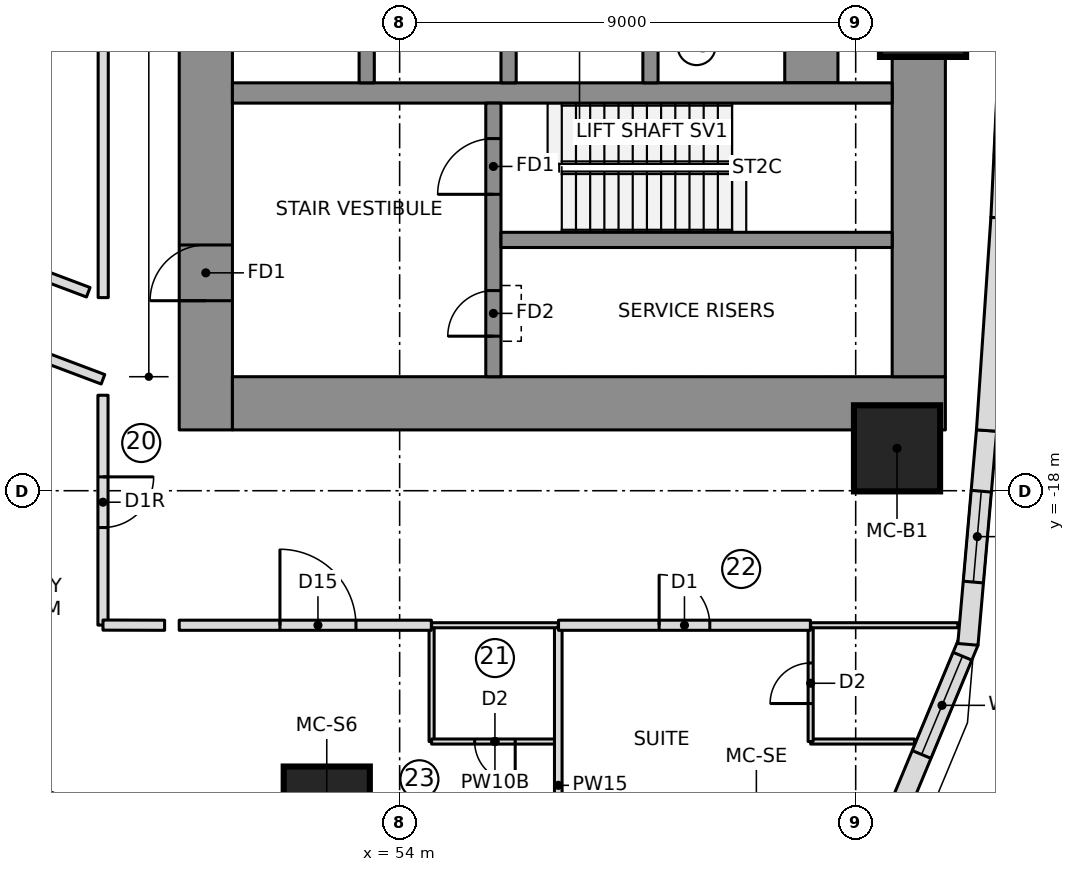
"""IFC4 building model, lengths in metres.
Left out: names, types, materials, properties, quantities, classifications, styles, units other than length and angle.
Written with IfcOpenShell. Run it as: python <this file> out.ifc"""

import sys

from ifc_helpers import new_model, si_unit, direction, frame, frame_2d, origin, origin_2d, place, context, subcontext, project, spatial, polyline, rectangle, outline, extrude, element, fill, save


model = new_model("IFC4")
c1 = context("Model", 3, precision=1e-05, world=origin(), true_north=direction((0.0, 1.0)))
c2 = subcontext(c1, "Body", "Model", "MODEL_VIEW")
j1 = project(units=[si_unit("LENGTHUNIT", "METRE"), si_unit("PLANEANGLEUNIT", "RADIAN")], contexts=[c1])
p1 = place(None, origin())
s1 = spatial("IfcSite", under=j1, at=p1, CompositionType="ELEMENT")
p2 = place(p1, origin())
s2 = spatial("IfcBuilding", under=s1, at=p2, CompositionType="ELEMENT")
p3 = place(p2, frame((0.0, 0.0, 80.3)))
s3 = spatial("IfcBuildingStorey", under=s2, at=p3, CompositionType="ELEMENT", Elevation=80.3)
p4 = place(p3, frame((50.175, -16.8, 0.0), z_axis=(0.0, 0.0, 1.0), x_axis=(0.0, 1.0, 0.0)))
e1 = element("IfcWall", 1, at=p4, inside=s3, PredefinedType="SHEAR", context=c2, shape_type="SweptSolid", body=[
    extrude(rectangle(XDim=10.15, YDim=1.05, at=frame_2d((5.075, 0.0))), origin(), (0.0, 0.0, 1.0), 4.6),
])
p5 = place(p4, frame((2.55, 0.0, 0.0)))
e2 = element("IfcOpeningElement", 2, at=p5, cuts=e1, PredefinedType="OPENING", context=c2, shape_type="SweptSolid", body=[
    extrude(rectangle(XDim=1.1, YDim=2.1, at=frame_2d((0.55, 1.05))), frame((0.0, 0.535, 0.0), z_axis=(0.0, -1.0, 0.0), x_axis=(1.0, 0.0, 0.0)), (0.0, 0.0, 1.0), 1.07),
])
p6 = place(p3, frame((50.7, -16.275, 0.0), z_axis=(0.0, 0.0, 1.0), x_axis=(1.0, 0.0, 0.0)))
e3 = element("IfcWall", 3, at=p6, inside=s3, PredefinedType="SHEAR", context=c2, shape_type="SweptSolid", body=[
    extrude(rectangle(XDim=14.07, YDim=1.05, at=frame_2d((7.035, 0.0))), origin(), (0.0, 0.0, 1.0), 4.6),
])
p7 = place(p3, frame((64.245, -15.75, 0.0), z_axis=(0.0, 0.0, 1.0), x_axis=(0.0, 1.0, 0.0)))
e4 = element("IfcWall", 4, at=p7, inside=s3, PredefinedType="SHEAR", context=c2, shape_type="SweptSolid", body=[
    extrude(rectangle(XDim=6.361, YDim=1.05, at=frame_2d((3.181, 0.0))), origin(), (0.0, 0.0, 1.0), 4.6),
])
p8 = place(p3, frame((62.125, -9.95, 0.0), z_axis=(0.0, 0.0, 1.0), x_axis=(0.0, 1.0, 0.0)))
e5 = element("IfcWall", 5, at=p8, inside=s3, PredefinedType="SHEAR", context=c2, shape_type="SweptSolid", body=[
    extrude(rectangle(XDim=19.9, YDim=1.05, at=frame_2d((9.95, 0.0))), origin(), (0.0, 0.0, 1.0), 4.6),
])
p9 = place(p3, frame((50.7, -10.15, 0.0), z_axis=(0.0, 0.0, 1.0), x_axis=(1.0, 0.0, 0.0)))
e6 = element("IfcWall", 6, at=p9, inside=s3, PredefinedType="SHEAR", context=c2, shape_type="SweptSolid", body=[
    extrude(rectangle(XDim=13.02, YDim=0.4, at=frame_2d((6.51, 0.0))), origin(), (0.0, 0.0, 1.0), 4.6),
])
for number, where, z_axis, x_axis in (
    (7, (53.35, -9.95, 0.0), (0.0, 0.0, 1.0), (0.0, 1.0, 0.0)),
    (8, (56.15, -9.95, 0.0), (0.0, 0.0, 1.0), (0.0, 1.0, 0.0)),
    (9, (58.95, -9.95, 0.0), (0.0, 0.0, 1.0), (0.0, 1.0, 0.0)),
):
    element("IfcWall", number, at=place(p3, frame(where, z_axis=z_axis, x_axis=x_axis)), inside=s3, PredefinedType="SHEAR", context=c2, shape_type="SweptSolid", body=[
        extrude(rectangle(XDim=3.0, YDim=0.3, at=frame_2d((1.5, 0.0))), origin(), (0.0, 0.0, 1.0), 4.6),
    ])
p10 = place(p3, frame((55.85, -15.75, 0.0), z_axis=(0.0, 0.0, 1.0), x_axis=(0.0, 1.0, 0.0)))
e10 = element("IfcWall", 10, at=p10, inside=s3, PredefinedType="SHEAR", context=c2, shape_type="SweptSolid", body=[
    extrude(rectangle(XDim=5.4, YDim=0.3, at=frame_2d((2.7, 0.0))), origin(), (0.0, 0.0, 1.0), 4.6),
])
p11 = place(p10, frame((3.6, 0.0, 0.0)))
e11 = element("IfcOpeningElement", 11, at=p11, cuts=e10, PredefinedType="OPENING", context=c2, shape_type="SweptSolid", body=[
    extrude(rectangle(XDim=1.1, YDim=2.1, at=frame_2d((0.55, 1.05))), frame((0.0, 0.16, 0.0), z_axis=(0.0, -1.0, 0.0), x_axis=(1.0, 0.0, 0.0)), (0.0, 0.0, 1.0), 0.32),
])
p12 = place(p10, frame((0.8, 0.0, 0.0)))
e12 = element("IfcOpeningElement", 12, at=p12, cuts=e10, PredefinedType="OPENING", context=c2, shape_type="SweptSolid", body=[
    extrude(rectangle(XDim=0.9, YDim=2.1, at=frame_2d((0.45, 1.05))), frame((0.0, 0.16, 0.0), z_axis=(0.0, -1.0, 0.0), x_axis=(1.0, 0.0, 0.0)), (0.0, 0.0, 1.0), 0.32),
])
p13 = place(p3, frame((56.0, -13.05, 0.0), z_axis=(0.0, 0.0, 1.0), x_axis=(1.0, 0.0, 0.0)))
e13 = element("IfcWall", 13, at=p13, inside=s3, PredefinedType="SHEAR", context=c2, shape_type="SweptSolid", body=[
    extrude(rectangle(XDim=7.72, YDim=0.3, at=frame_2d((3.86, 0.0))), origin(), (0.0, 0.0, 1.0), 4.6),
])
for number, where, z_axis, x_axis in (
    (14, (52.562, -24.293, 0.0), (0.0, 0.0, 1.0), (1.0, 0.0, 0.0)),
    (15, (63.816, -17.164, 0.0), (0.0, 0.0, 1.0), (1.0, 0.0, 0.0)),
    (16, (64.329, -8.589, 0.0), (0.0, 0.0, 1.0), (1.0, 0.0, 0.0)),
):
    element("IfcColumn", number, at=place(p3, frame(where, z_axis=z_axis, x_axis=x_axis)), inside=s3, PredefinedType="COLUMN", context=c2, shape_type="SweptSolid", body=[
        extrude(rectangle(XDim=1.7, YDim=1.7, at=origin_2d()), origin(), (0.0, 0.0, 1.0), 4.6),
    ])
p14 = place(p3, frame((63.59, -24.916, 0.0), z_axis=(0.0, 0.0, 1.0), x_axis=(0.383997751971, 0.923334027577, 0.0)))
e17 = element("IfcWall", 17, at=p14, inside=s3, PredefinedType="NOTDEFINED", context=c2, shape_type="SweptSolid", body=[
    extrude(outline(polyline([(-0.061, -0.2), (4.27, -0.2), (4.208, 0.2), (0.061, 0.2), (-0.061, -0.2)])), origin(), (0.0, 0.0, 1.0), 4.3),
])
p15 = place(p14, frame((1.852, 0.0, 0.6)))
e18 = element("IfcOpeningElement", 18, at=p15, cuts=e17, PredefinedType="OPENING", context=c2, shape_type="SweptSolid", body=[
    extrude(outline(polyline([(0.0, 1.4), (0.08, 1.802), (0.308, 2.142), (0.648, 2.37), (1.05, 2.45), (1.452, 2.37), (1.792, 2.142), (2.02, 1.802), (2.1, 1.4), (2.1, 1.05), (2.02, 0.648), (1.792, 0.308), (1.452, 0.08), (1.05, 0.0), (0.648, 0.08), (0.308, 0.308), (0.08, 0.648), (0.0, 1.05), (0.0, 1.4)])), frame((0.0, 0.21, 0.0), z_axis=(0.0, -1.0, 0.0), x_axis=(1.0, 0.0, 0.0)), (0.0, 0.0, 1.0), 0.42),
])
p16 = place(p3, frame((65.217, -21.002, 0.0), z_axis=(0.0, 0.0, 1.0), x_axis=(0.086992730434, 0.996208946382, 0.0)))
e19 = element("IfcWall", 19, at=p16, inside=s3, PredefinedType="NOTDEFINED", context=c2, shape_type="SweptSolid", body=[
    extrude(outline(polyline([(-0.031, -0.2), (4.209, -0.2), (4.205, 0.2), (0.031, 0.2), (-0.031, -0.2)])), origin(), (0.0, 0.0, 1.0), 4.3),
])
p17 = place(p16, frame((1.203, 0.0, 1.8)))
e20 = element("IfcOpeningElement", 20, at=p17, cuts=e19, PredefinedType="OPENING", context=c2, shape_type="SweptSolid", body=[
    extrude(rectangle(XDim=1.8, YDim=1.2, at=frame_2d((0.9, 0.6))), frame((0.0, 0.21, 0.0), z_axis=(0.0, -1.0, 0.0), x_axis=(1.0, 0.0, 0.0)), (0.0, 0.0, 1.0), 0.42),
])
p18 = place(p3, frame((65.583, -16.811, 0.0), z_axis=(0.0, 0.0, 1.0), x_axis=(0.067724559895, 0.997704056315, 0.0)))
e21 = element("IfcWall", 21, at=p18, inside=s3, PredefinedType="NOTDEFINED", context=c2, shape_type="SweptSolid", body=[
    extrude(outline(polyline([(-0.002, -0.2), (4.209, -0.2), (4.205, 0.2), (0.002, 0.2), (-0.002, -0.2)])), origin(), (0.0, 0.0, 1.0), 4.3),
])
p19 = place(p3, frame((65.868, -12.614, 0.0), z_axis=(0.0, 0.0, 1.0), x_axis=(0.048342691508, 0.998830808585, 0.0)))
e22 = element("IfcWall", 22, at=p19, inside=s3, PredefinedType="NOTDEFINED", context=c2, shape_type="SweptSolid", body=[
    extrude(outline(polyline([(-0.002, -0.2), (4.209, -0.2), (4.205, 0.2), (0.002, 0.2), (-0.002, -0.2)])), origin(), (0.0, 0.0, 1.0), 4.3),
])
p20 = place(p19, frame((1.203, 0.0, 1.8)))
e23 = element("IfcOpeningElement", 23, at=p20, cuts=e22, PredefinedType="OPENING", context=c2, shape_type="SweptSolid", body=[
    extrude(rectangle(XDim=1.8, YDim=1.2, at=frame_2d((0.9, 0.6))), frame((0.0, 0.21, 0.0), z_axis=(0.0, -1.0, 0.0), x_axis=(1.0, 0.0, 0.0)), (0.0, 0.0, 1.0), 0.42),
])
p21 = place(p3, frame((44.038, -23.775, 0.0), z_axis=(0.0, 0.0, 1.0), x_axis=(0.928295561605, -0.371843179719, 0.0)))
e24 = element("IfcWall", 24, at=p21, inside=s3, PredefinedType="PARAPET", context=c2, shape_type="SweptSolid", body=[
    extrude(rectangle(XDim=4.186, YDim=0.2, at=frame_2d((2.093, 0.0))), origin(), (0.0, 0.0, 1.0), 1.1),
])
p22 = place(p3, frame((54.631, -22.95, 0.0), z_axis=(0.0, 0.0, 1.0), x_axis=(0.0, 1.0, 0.0)))
e25 = element("IfcWall", 25, at=p22, inside=s3, PredefinedType="PARTITIONING", context=c2, shape_type="SweptSolid", body=[
    extrude(rectangle(XDim=2.3, YDim=0.1, at=frame_2d((1.15, 0.0))), origin(), (0.0, 0.0, 1.0), 4.3),
])
p23 = place(p3, frame((57.131, -22.95, 0.0), z_axis=(0.0, 0.0, 1.0), x_axis=(-1.0, 0.0, 0.0)))
e26 = element("IfcWall", 26, at=p23, inside=s3, PredefinedType="PARTITIONING", context=c2, shape_type="SweptSolid", body=[
    extrude(rectangle(XDim=2.5, YDim=0.1, at=frame_2d((1.25, 0.0))), origin(), (0.0, 0.0, 1.0), 4.3),
])
p24 = place(p23, frame((0.85, 0.0, 0.0)))
e27 = element("IfcOpeningElement", 27, at=p24, cuts=e26, PredefinedType="OPENING", context=c2, shape_type="SweptSolid", body=[
    extrude(rectangle(XDim=0.8, YDim=2.1, at=frame_2d((0.4, 1.05))), frame((0.0, 0.06, 0.0), z_axis=(0.0, -1.0, 0.0), x_axis=(1.0, 0.0, 0.0)), (0.0, 0.0, 1.0), 0.12),
])
p25 = place(p3, frame((64.16, -22.95, 0.0), z_axis=(0.0, 0.0, 1.0), x_axis=(-1.0, 0.0, 0.0)))
e28 = element("IfcWall", 28, at=p25, inside=s3, PredefinedType="PARTITIONING", context=c2, shape_type="SweptSolid", body=[
    extrude(rectangle(XDim=2.049, YDim=0.1, at=frame_2d((1.025, 0.0))), origin(), (0.0, 0.0, 1.0), 4.3),
])
p26 = place(p3, frame((62.111, -22.95, 0.0), z_axis=(0.0, 0.0, 1.0), x_axis=(0.0, 1.0, 0.0)))
e29 = element("IfcWall", 29, at=p26, inside=s3, PredefinedType="PARTITIONING", context=c2, shape_type="SweptSolid", body=[
    extrude(rectangle(XDim=2.3, YDim=0.1, at=frame_2d((1.15, 0.0))), origin(), (0.0, 0.0, 1.0), 4.3),
])
p27 = place(p26, frame((0.75, 0.0, 0.0)))
e30 = element("IfcOpeningElement", 30, at=p27, cuts=e29, PredefinedType="OPENING", context=c2, shape_type="SweptSolid", body=[
    extrude(rectangle(XDim=0.8, YDim=2.1, at=frame_2d((0.4, 1.05))), frame((0.0, 0.06, 0.0), z_axis=(0.0, -1.0, 0.0), x_axis=(1.0, 0.0, 0.0)), (0.0, 0.0, 1.0), 0.12),
])
p28 = place(p3, frame((57.131, -26.979, 0.0), z_axis=(0.0, 0.0, 1.0), x_axis=(0.0, 1.0, 0.0)))
e31 = element("IfcWall", 31, at=p28, inside=s3, PredefinedType="PARTITIONING", context=c2, shape_type="SweptSolid", body=[
    extrude(rectangle(XDim=6.329, YDim=0.15, at=frame_2d((3.165, 0.0))), origin(), (0.0, 0.0, 1.0), 4.3),
])
p29 = place(p3, frame((49.65, -20.655, 0.0), z_axis=(0.0, 0.0, 1.0), x_axis=(1.0, 0.0, 0.0)))
e32 = element("IfcWall", 32, at=p29, inside=s3, PredefinedType="PARTITIONING", context=c2, shape_type="SweptSolid", body=[
    extrude(rectangle(XDim=4.976, YDim=0.2, at=frame_2d((2.488, 0.0))), origin(), (0.0, 0.0, 1.0), 4.3),
])
p30 = place(p29, frame((1.988, 0.0, 0.0)))
e33 = element("IfcOpeningElement", 33, at=p30, cuts=e32, PredefinedType="OPENING", context=c2, shape_type="SweptSolid", body=[
    extrude(rectangle(XDim=1.5, YDim=2.1, at=frame_2d((0.75, 1.05))), frame((0.0, 0.11, 0.0), z_axis=(0.0, -1.0, 0.0), x_axis=(1.0, 0.0, 0.0)), (0.0, 0.0, 1.0), 0.22),
])
p31 = place(p3, frame((57.135, -20.655, 0.0), z_axis=(0.0, 0.0, 1.0), x_axis=(1.0, 0.0, 0.0)))
e34 = element("IfcWall", 34, at=p31, inside=s3, PredefinedType="PARTITIONING", context=c2, shape_type="SweptSolid", body=[
    extrude(rectangle(XDim=4.971, YDim=0.2, at=frame_2d((2.485, 0.0))), origin(), (0.0, 0.0, 1.0), 4.3),
])
p32 = place(p31, frame((1.985, 0.0, 0.0)))
e35 = element("IfcOpeningElement", 35, at=p32, cuts=e34, PredefinedType="OPENING", context=c2, shape_type="SweptSolid", body=[
    extrude(rectangle(XDim=1.0, YDim=2.1, at=frame_2d((0.5, 1.05))), frame((0.0, 0.11, 0.0), z_axis=(0.0, -1.0, 0.0), x_axis=(1.0, 0.0, 0.0)), (0.0, 0.0, 1.0), 0.22),
])
p33 = place(p3, frame((54.631, -20.655, 0.0), z_axis=(0.0, 0.0, 1.0), x_axis=(1.0, 0.0, 0.0)))
e36 = element("IfcWall", 36, at=p33, inside=s3, PredefinedType="PARTITIONING", context=c2, shape_type="SweptSolid", body=[
    extrude(rectangle(XDim=2.5, YDim=0.1, at=frame_2d((1.25, 0.0))), origin(), (0.0, 0.0, 1.0), 4.3),
])
p34 = place(p3, frame((62.111, -20.655, 0.0), z_axis=(0.0, 0.0, 1.0), x_axis=(1.0, 0.0, 0.0)))
e37 = element("IfcWall", 37, at=p34, inside=s3, PredefinedType="PARTITIONING", context=c2, shape_type="SweptSolid", body=[
    extrude(rectangle(XDim=2.906, YDim=0.1, at=frame_2d((1.453, 0.0))), origin(), (0.0, 0.0, 1.0), 4.3),
])
p35 = place(p3, frame((47.855, -14.083, 0.0), z_axis=(0.0, 0.0, 1.0), x_axis=(-0.935907269358, 0.352246480696, 0.0)))
e38 = element("IfcWall", 38, at=p35, inside=s3, PredefinedType="PARTITIONING", context=c2, shape_type="SweptSolid", body=[
    extrude(rectangle(XDim=1.239, YDim=0.2, at=frame_2d((0.619, 0.0))), origin(), (0.0, 0.0, 1.0), 4.3),
])
p36 = place(p3, frame((48.145, -16.116, 0.0), z_axis=(0.0, 0.0, 1.0), x_axis=(5.3821313e-05, -0.999999998552, 0.0)))
e39 = element("IfcWall", 39, at=p36, inside=s3, PredefinedType="PARTITIONING", context=c2, shape_type="SweptSolid", body=[
    extrude(rectangle(XDim=4.536, YDim=0.2, at=frame_2d((2.268, 0.0))), origin(), (0.0, 0.0, 1.0), 4.3),
])
p37 = place(p36, frame((1.611, 0.0, 0.0)))
e40 = element("IfcOpeningElement", 40, at=p37, cuts=e39, PredefinedType="OPENING", context=c2, shape_type="SweptSolid", body=[
    extrude(rectangle(XDim=1.0, YDim=2.1, at=frame_2d((0.5, 1.05))), frame((0.0, 0.11, 0.0), z_axis=(0.0, -1.0, 0.0), x_axis=(1.0, 0.0, 0.0)), (0.0, 0.0, 1.0), 0.22),
])
p38 = place(p3, frame((48.15, 14.189, 0.0), z_axis=(0.0, 0.0, 1.0), x_axis=(0.0, -1.0, 0.0)))
e41 = element("IfcWall", 41, at=p38, inside=s3, PredefinedType="PARTITIONING", context=c2, shape_type="SweptSolid", body=[
    extrude(rectangle(XDim=28.377, YDim=0.2, at=frame_2d((14.189, 0.0))), origin(), (0.0, 0.0, 1.0), 4.3),
])
p39 = place(p3, frame((46.93, -15.343, 0.0), z_axis=(0.0, 0.0, 1.0), x_axis=(0.935833600022, -0.352442155635, 0.0)))
e42 = element("IfcWall", 42, at=p39, inside=s3, PredefinedType="PARTITIONING", context=c2, shape_type="SweptSolid", body=[
    extrude(rectangle(XDim=1.298, YDim=0.2, at=frame_2d((0.649, 0.0))), origin(), (0.0, 0.0, 1.0), 4.3),
])
p40 = place(p3, frame((48.146, -20.652, 0.0), z_axis=(0.0, 0.0, 1.0), x_axis=(0.999996595549, -0.002609384934, 0.0)))
e43 = element("IfcWall", 43, at=p40, inside=s3, PredefinedType="PARTITIONING", context=c2, shape_type="SweptSolid", body=[
    extrude(rectangle(XDim=1.216, YDim=0.2, at=frame_2d((0.608, 0.0))), origin(), (0.0, 0.0, 1.0), 4.3),
])
p41 = place(p15, origin())
e44 = element("IfcWindow", 44, at=p41, inside=s3, PartitioningType="SINGLE_PANEL", PredefinedType="WINDOW", context=c2, shape_type="SweptSolid", body=[
    extrude(outline(polyline([(0.0, 1.4), (0.08, 1.802), (0.308, 2.142), (0.648, 2.37), (1.05, 2.45), (1.452, 2.37), (1.792, 2.142), (2.02, 1.802), (2.1, 1.4), (2.1, 1.05), (2.02, 0.648), (1.792, 0.308), (1.452, 0.08), (1.05, 0.0), (0.648, 0.08), (0.308, 0.308), (0.08, 0.648), (0.0, 1.05), (0.0, 1.4)])), frame((0.0, 0.17, 0.0), z_axis=(0.0, -1.0, 0.0), x_axis=(1.0, 0.0, 0.0)), (0.0, 0.0, 1.0), 0.06),
])
fill(e18, e44)
p42 = place(p17, origin())
e45 = element("IfcWindow", 45, at=p42, inside=s3, PartitioningType="SINGLE_PANEL", PredefinedType="WINDOW", context=c2, shape_type="SweptSolid", body=[
    extrude(rectangle(XDim=1.8, YDim=1.2, at=frame_2d((0.9, 0.6))), frame((0.0, 0.17, 0.0), z_axis=(0.0, -1.0, 0.0), x_axis=(1.0, 0.0, 0.0)), (0.0, 0.0, 1.0), 0.06),
])
fill(e20, e45)
p43 = place(p20, origin())
e46 = element("IfcWindow", 46, at=p43, inside=s3, PartitioningType="SINGLE_PANEL", PredefinedType="WINDOW", context=c2, shape_type="SweptSolid", body=[
    extrude(rectangle(XDim=1.8, YDim=1.2, at=frame_2d((0.9, 0.6))), frame((0.0, 0.17, 0.0), z_axis=(0.0, -1.0, 0.0), x_axis=(1.0, 0.0, 0.0)), (0.0, 0.0, 1.0), 0.06),
])
fill(e23, e46)
p44 = place(p24, origin())
e47 = element("IfcDoor", 47, at=p44, inside=s3, OperationType="SINGLE_SWING_LEFT", PredefinedType="DOOR", context=c2, shape_type="SweptSolid", body=[
    extrude(rectangle(XDim=0.8, YDim=2.1, at=frame_2d((0.4, 1.05))), frame((0.0, 0.025, 0.0), z_axis=(0.0, -1.0, 0.0), x_axis=(1.0, 0.0, 0.0)), (0.0, 0.0, 1.0), 0.05),
])
fill(e27, e47)
p45 = place(p27, origin())
e48 = element("IfcDoor", 48, at=p45, inside=s3, OperationType="SINGLE_SWING_LEFT", PredefinedType="DOOR", context=c2, shape_type="SweptSolid", body=[
    extrude(rectangle(XDim=0.8, YDim=2.1, at=frame_2d((0.4, 1.05))), frame((0.0, 0.025, 0.0), z_axis=(0.0, -1.0, 0.0), x_axis=(1.0, 0.0, 0.0)), (0.0, 0.0, 1.0), 0.05),
])
fill(e30, e48)
p46 = place(p30, origin())
e49 = element("IfcDoor", 49, at=p46, inside=s3, OperationType="DOUBLE_DOOR_SINGLE_SWING", PredefinedType="DOOR", context=c2, shape_type="SweptSolid", body=[
    extrude(rectangle(XDim=1.5, YDim=2.1, at=frame_2d((0.75, 1.05))), frame((0.0, 0.025, 0.0), z_axis=(0.0, -1.0, 0.0), x_axis=(1.0, 0.0, 0.0)), (0.0, 0.0, 1.0), 0.05),
])
fill(e33, e49)
p47 = place(p32, origin())
e50 = element("IfcDoor", 50, at=p47, inside=s3, OperationType="SINGLE_SWING_LEFT", PredefinedType="DOOR", context=c2, shape_type="SweptSolid", body=[
    extrude(rectangle(XDim=1.0, YDim=2.1, at=frame_2d((0.5, 1.05))), frame((0.0, 0.025, 0.0), z_axis=(0.0, -1.0, 0.0), x_axis=(1.0, 0.0, 0.0)), (0.0, 0.0, 1.0), 0.05),
])
fill(e35, e50)
p48 = place(p37, origin())
e51 = element("IfcDoor", 51, at=p48, inside=s3, OperationType="SINGLE_SWING_RIGHT", PredefinedType="DOOR", context=c2, shape_type="SweptSolid", body=[
    extrude(rectangle(XDim=1.0, YDim=2.1, at=frame_2d((0.5, 1.05))), frame((0.0, 0.025, 0.0), z_axis=(0.0, -1.0, 0.0), x_axis=(1.0, 0.0, 0.0)), (0.0, 0.0, 1.0), 0.05),
])
fill(e40, e51)
p49 = place(p11, origin())
e52 = element("IfcDoor", 52, at=p49, inside=s3, OperationType="SINGLE_SWING_RIGHT", PredefinedType="DOOR", context=c2, shape_type="SweptSolid", body=[
    extrude(rectangle(XDim=1.1, YDim=2.1, at=frame_2d((0.55, 1.05))), frame((0.0, 0.025, 0.0), z_axis=(0.0, -1.0, 0.0), x_axis=(1.0, 0.0, 0.0)), (0.0, 0.0, 1.0), 0.05),
])
fill(e11, e52)
p50 = place(p5, origin())
e53 = element("IfcDoor", 53, at=p50, inside=s3, OperationType="SINGLE_SWING_RIGHT", PredefinedType="DOOR", context=c2, shape_type="SweptSolid", body=[
    extrude(rectangle(XDim=1.1, YDim=2.1, at=frame_2d((0.55, 1.05))), frame((0.0, 0.025, 0.0), z_axis=(0.0, -1.0, 0.0), x_axis=(1.0, 0.0, 0.0)), (0.0, 0.0, 1.0), 0.05),
])
fill(e2, e53)
p51 = place(p12, origin())
e54 = element("IfcDoor", 54, at=p51, inside=s3, OperationType="SINGLE_SWING_LEFT", PredefinedType="DOOR", context=c2, shape_type="SweptSolid", body=[
    extrude(rectangle(XDim=0.9, YDim=2.1, at=frame_2d((0.45, 1.05))), frame((0.0, 0.025, 0.0), z_axis=(0.0, -1.0, 0.0), x_axis=(1.0, 0.0, 0.0)), (0.0, 0.0, 1.0), 0.05),
])
fill(e12, e54)
save(model, sys.argv[1])
